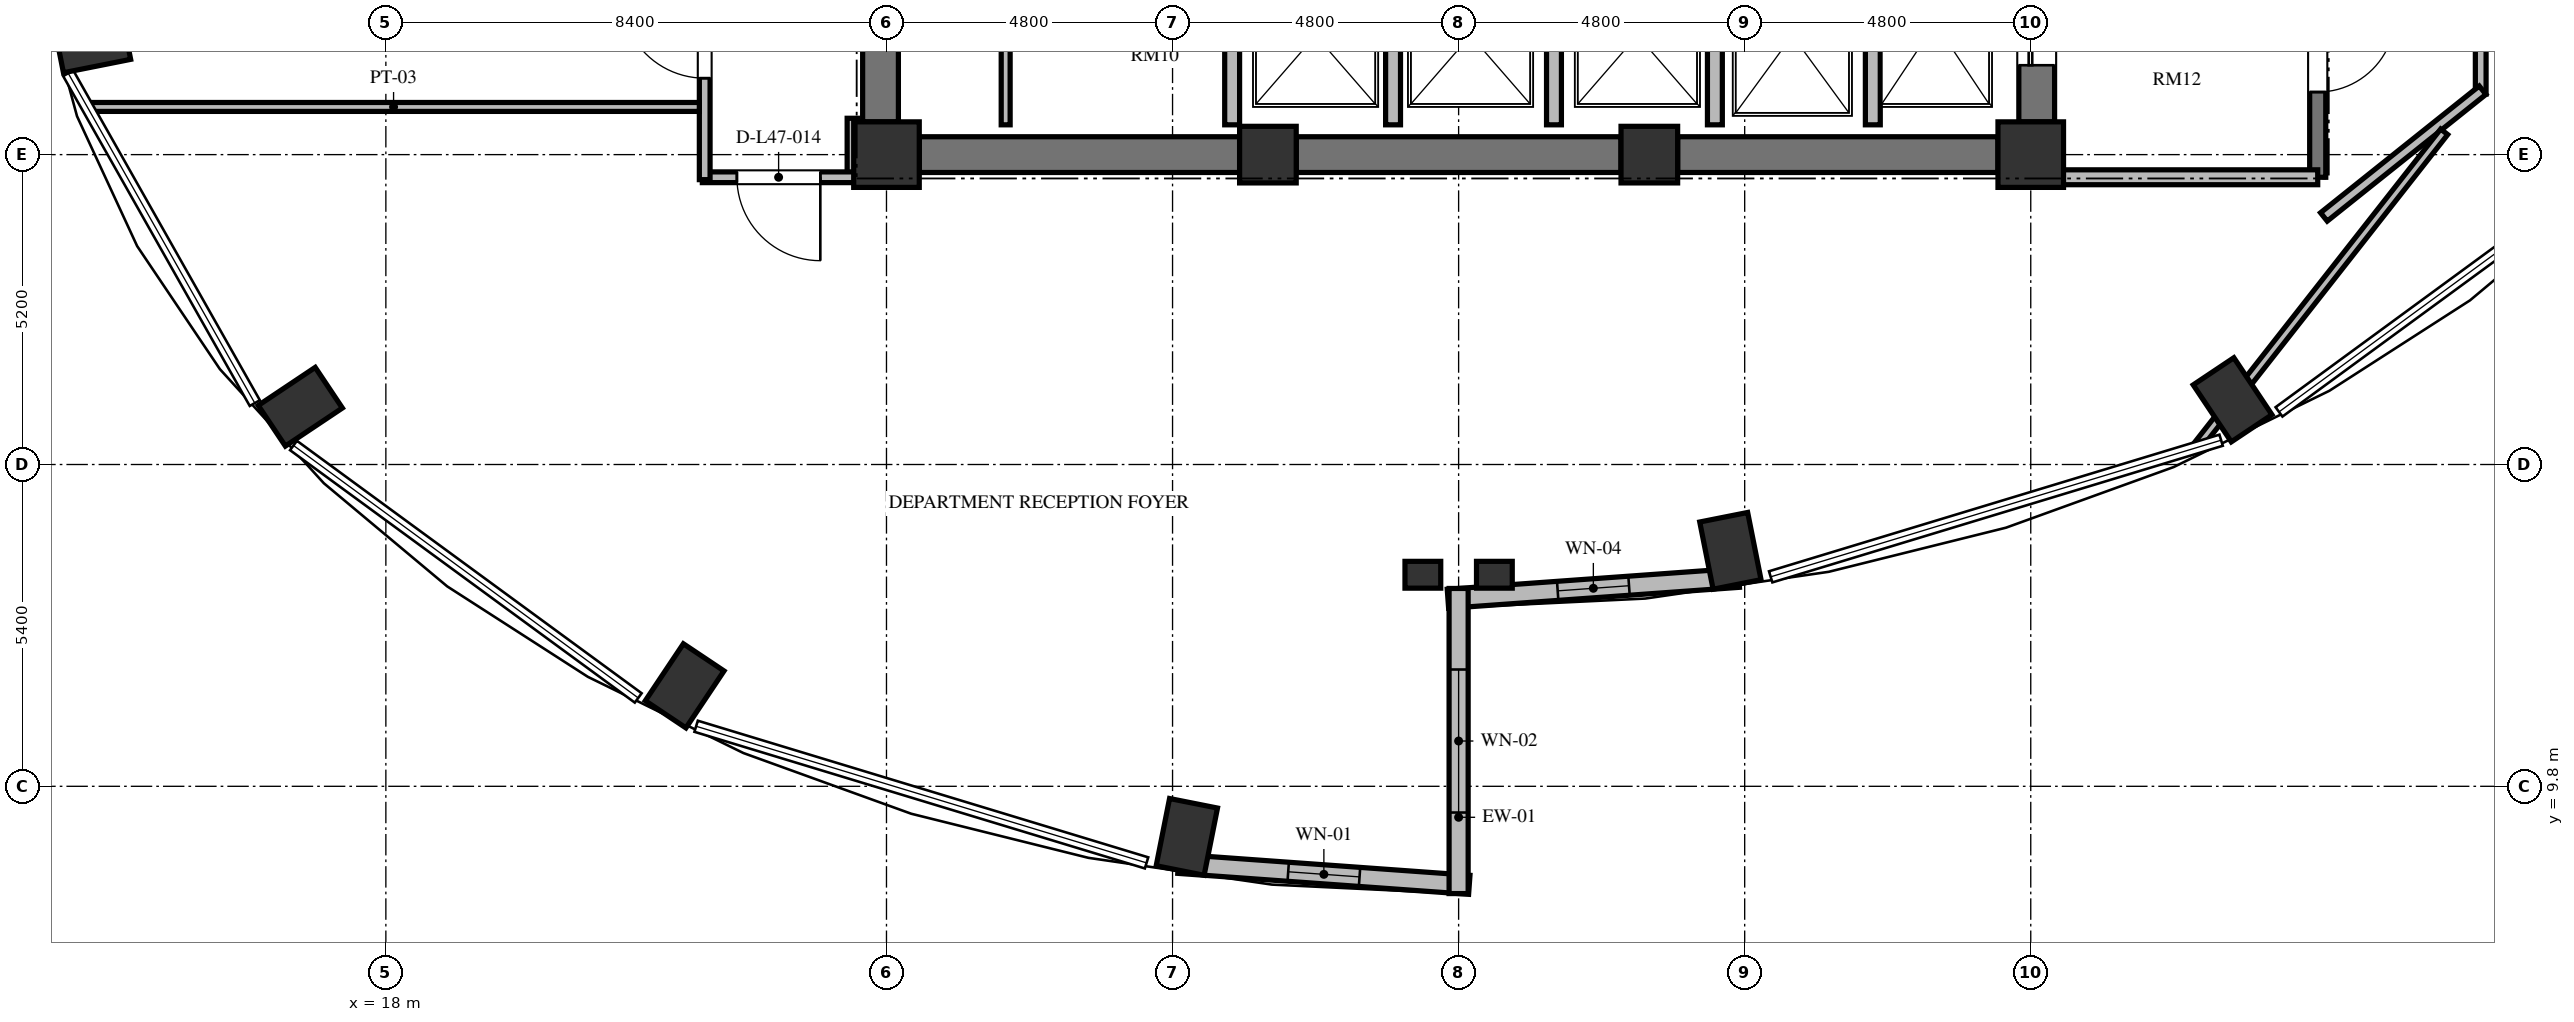
"""IFC4 building model, lengths in metres.
Left out: names, types, materials, properties, quantities, classifications, styles, units other than length and angle.
Written with IfcOpenShell. Run it as: python <this file> out.ifc"""

import sys

from ifc_helpers import new_model, si_unit, direction, frame, frame_2d, origin, origin_2d, place, context, subcontext, project, spatial, rectangle, extrude, element, fill, save


model = new_model("IFC4")
c1 = context("Model", 3, precision=1e-05, world=origin(), true_north=direction((0.0, 1.0)))
c2 = subcontext(c1, "Body", "Model", "MODEL_VIEW")
j1 = project(units=[si_unit("LENGTHUNIT", "METRE"), si_unit("PLANEANGLEUNIT", "RADIAN")], contexts=[c1])
p1 = place(None, origin())
s1 = spatial("IfcSite", under=j1, at=p1, CompositionType="ELEMENT")
p2 = place(p1, origin())
s2 = spatial("IfcBuilding", under=s1, at=p2, CompositionType="ELEMENT")
p3 = place(p2, frame((0.0, 0.0, 182.064)))
s3 = spatial("IfcBuildingStorey", under=s2, at=p3, CompositionType="ELEMENT", Elevation=182.064)
for number, where, z_axis, x_axis in (
    (1, (40.56, 13.751, 0.0), (0.0, 0.0, 1.0), (0.195, -0.981, 0.0)),
    (2, (48.987, 16.286, 0.0), (0.0, 0.0, 1.0), (0.556, -0.831, 0.0)),
    (3, (13.074, 22.288, 0.0), (0.0, 0.0, 1.0), (-0.981, -0.195, 0.0)),
    (4, (16.564, 16.169, 0.0), (0.0, 0.0, 1.0), (-0.831, -0.556, 0.0)),
    (5, (23.013, 11.486, 0.0), (0.0, 0.0, 1.0), (-0.556, -0.831, 0.0)),
    (6, (31.44, 8.951, 0.0), (0.0, 0.0, 1.0), (-0.195, -0.981, 0.0)),
):
    element("IfcColumn", number, at=place(p3, frame(where, z_axis=z_axis, x_axis=x_axis)), inside=s3, PredefinedType="COLUMN", context=c2, shape_type="SweptSolid", body=[
        extrude(rectangle(XDim=1.15, YDim=0.82, at=origin_2d()), origin(), (0.0, 0.0, 1.0), 3.648),
    ])
p4 = place(p3, frame((26.4, 20.4, 0.0), z_axis=(0.0, 0.0, 1.0), x_axis=(1.0, 0.0, 0.0)))
e7 = element("IfcColumn", 7, at=p4, inside=s3, PredefinedType="COLUMN", context=c2, shape_type="SweptSolid", body=[
    extrude(rectangle(XDim=1.1, YDim=1.1, at=origin_2d()), origin(), (0.0, 0.0, 1.0), 3.648),
])
for number, where, z_axis, x_axis in (
    (8, (32.8, 20.4, 0.0), (0.0, 0.0, 1.0), (1.0, 0.0, 0.0)),
    (9, (39.2, 20.4, 0.0), (0.0, 0.0, 1.0), (1.0, 0.0, 0.0)),
):
    element("IfcColumn", number, at=place(p3, frame(where, z_axis=z_axis, x_axis=x_axis)), inside=s3, PredefinedType="COLUMN", context=c2, shape_type="SweptSolid", body=[
        extrude(rectangle(XDim=0.95, YDim=0.95, at=origin_2d()), origin(), (0.0, 0.0, 1.0), 3.648),
    ])
p5 = place(p3, frame((45.6, 20.4, 0.0), z_axis=(0.0, 0.0, 1.0), x_axis=(1.0, 0.0, 0.0)))
e10 = element("IfcColumn", 10, at=p5, inside=s3, PredefinedType="COLUMN", context=c2, shape_type="SweptSolid", body=[
    extrude(rectangle(XDim=1.1, YDim=1.1, at=origin_2d()), origin(), (0.0, 0.0, 1.0), 3.648),
])
for number, where, z_axis, x_axis in (
    (11, (35.4, 13.35, 0.0), (0.0, 0.0, 1.0), (1.0, 0.0, 0.0)),
    (12, (36.6, 13.35, 0.0), (0.0, 0.0, 1.0), (1.0, 0.0, 0.0)),
):
    element("IfcColumn", number, at=place(p3, frame(where, z_axis=z_axis, x_axis=x_axis)), inside=s3, PredefinedType="PILASTER", context=c2, shape_type="SweptSolid", body=[
        extrude(rectangle(XDim=0.6, YDim=0.45, at=origin_2d()), origin(), (0.0, 0.0, 1.0), 3.648),
    ])
p6 = place(p3, frame((26.3, 20.95, 0.0), z_axis=(0.0, 0.0, 1.0), x_axis=(0.0, 1.0, 0.0)))
e13 = element("IfcWall", 13, at=p6, inside=s3, PredefinedType="SHEAR", context=c2, shape_type="SweptSolid", body=[
    extrude(rectangle(XDim=14.1, YDim=0.6, at=frame_2d((7.05, 0.0))), origin(), (0.0, 0.0, 1.0), 3.648),
])
p7 = place(p6, frame((6.5, 0.0, 0.0)))
e14 = element("IfcOpeningElement", 14, at=p7, cuts=e13, PredefinedType="OPENING", context=c2, shape_type="SweptSolid", body=[
    extrude(rectangle(XDim=1.2, YDim=2.15, at=frame_2d((0.6, 1.075))), frame((0.0, 0.31, 0.0), z_axis=(0.0, -1.0, 0.0), x_axis=(1.0, 0.0, 0.0)), (0.0, 0.0, 1.0), 0.62),
])
p8 = place(p6, frame((9.6, 0.0, 0.0)))
e15 = element("IfcOpeningElement", 15, at=p8, cuts=e13, PredefinedType="OPENING", context=c2, shape_type="SweptSolid", body=[
    extrude(rectangle(XDim=1.3, YDim=2.2, at=frame_2d((0.65, 1.1))), frame((0.0, 0.31, 0.0), z_axis=(0.0, -1.0, 0.0), x_axis=(1.0, 0.0, 0.0)), (0.0, 0.0, 1.0), 0.62),
])
p9 = place(p6, frame((3.26, 0.0, 0.0)))
e16 = element("IfcOpeningElement", 16, at=p9, cuts=e13, PredefinedType="OPENING", context=c2, shape_type="SweptSolid", body=[
    extrude(rectangle(XDim=1.3, YDim=2.2, at=frame_2d((0.65, 1.1))), frame((0.0, 0.31, 0.0), z_axis=(0.0, -1.0, 0.0), x_axis=(1.0, 0.0, 0.0)), (0.0, 0.0, 1.0), 0.62),
])
p10 = place(p3, frame((45.7, 20.95, 0.0), z_axis=(0.0, 0.0, 1.0), x_axis=(0.0, 1.0, 0.0)))
e17 = element("IfcWall", 17, at=p10, inside=s3, PredefinedType="SHEAR", context=c2, shape_type="SweptSolid", body=[
    extrude(rectangle(XDim=14.1, YDim=0.6, at=frame_2d((7.05, 0.0))), origin(), (0.0, 0.0, 1.0), 3.648),
])
p11 = place(p10, frame((11.75, 0.0, 0.0)))
e18 = element("IfcOpeningElement", 18, at=p11, cuts=e17, PredefinedType="OPENING", context=c2, shape_type="SweptSolid", body=[
    extrude(rectangle(XDim=1.4, YDim=2.3, at=frame_2d((0.7, 1.15))), frame((0.0, 0.31, 0.0), z_axis=(0.0, -1.0, 0.0), x_axis=(1.0, 0.0, 0.0)), (0.0, 0.0, 1.0), 0.62),
])
p12 = place(p10, frame((0.95, 0.0, 0.0)))
e19 = element("IfcOpeningElement", 19, at=p12, cuts=e17, PredefinedType="OPENING", context=c2, shape_type="SweptSolid", body=[
    extrude(rectangle(XDim=1.4, YDim=2.3, at=frame_2d((0.7, 1.15))), frame((0.0, 0.31, 0.0), z_axis=(0.0, -1.0, 0.0), x_axis=(1.0, 0.0, 0.0)), (0.0, 0.0, 1.0), 0.62),
])
p13 = place(p3, frame((26.95, 20.4, 0.0), z_axis=(0.0, 0.0, 1.0), x_axis=(1.0, 0.0, 0.0)))
e20 = element("IfcWall", 20, at=p13, inside=s3, PredefinedType="SHEAR", context=c2, shape_type="SweptSolid", body=[
    extrude(rectangle(XDim=5.375, YDim=0.6, at=frame_2d((2.688, 0.0))), origin(), (0.0, 0.0, 1.0), 3.648),
])
p14 = place(p3, frame((33.275, 20.4, 0.0), z_axis=(0.0, 0.0, 1.0), x_axis=(1.0, 0.0, 0.0)))
e21 = element("IfcWall", 21, at=p14, inside=s3, PredefinedType="SHEAR", context=c2, shape_type="SweptSolid", body=[
    extrude(rectangle(XDim=5.45, YDim=0.6, at=frame_2d((2.725, 0.0))), origin(), (0.0, 0.0, 1.0), 3.648),
])
p15 = place(p3, frame((39.675, 20.4, 0.0), z_axis=(0.0, 0.0, 1.0), x_axis=(1.0, 0.0, 0.0)))
e22 = element("IfcWall", 22, at=p15, inside=s3, PredefinedType="SHEAR", context=c2, shape_type="SweptSolid", body=[
    extrude(rectangle(XDim=5.375, YDim=0.6, at=frame_2d((2.688, 0.0))), origin(), (0.0, 0.0, 1.0), 3.648),
])
p16 = place(p3, frame((35.821, 12.947, 0.0), z_axis=(0.0, 0.0, 1.0), x_axis=(0.997415460462, 0.071849838072, 0.0)))
e23 = element("IfcWall", 23, at=p16, inside=s3, PredefinedType="SOLIDWALL", context=c2, shape_type="SweptSolid", body=[
    extrude(rectangle(XDim=4.893, YDim=0.32, at=frame_2d((2.447, 0.0))), origin(), (0.0, 0.0, 1.0), 3.428),
])
p17 = place(p16, frame((1.846, 0.0, 0.85)))
e24 = element("IfcOpeningElement", 24, at=p17, cuts=e23, PredefinedType="OPENING", context=c2, shape_type="SweptSolid", body=[
    extrude(rectangle(XDim=1.2, YDim=1.8, at=frame_2d((0.6, 0.9))), frame((0.0, 0.17, 0.0), z_axis=(0.0, -1.0, 0.0), x_axis=(1.0, 0.0, 0.0)), (0.0, 0.0, 1.0), 0.34),
])
p18 = place(p3, frame((31.299, 8.499, 0.0), z_axis=(0.0, 0.0, 1.0), x_axis=(0.997415202861, -0.071853413984, 0.0)))
e25 = element("IfcWall", 25, at=p18, inside=s3, PredefinedType="SOLIDWALL", context=c2, shape_type="SweptSolid", body=[
    extrude(rectangle(XDim=4.893, YDim=0.32, at=frame_2d((2.446, 0.0))), origin(), (0.0, 0.0, 1.0), 3.428),
])
p19 = place(p18, frame((1.846, 0.0, 0.85)))
e26 = element("IfcOpeningElement", 26, at=p19, cuts=e25, PredefinedType="OPENING", context=c2, shape_type="SweptSolid", body=[
    extrude(rectangle(XDim=1.2, YDim=2.2, at=frame_2d((0.6, 1.1))), frame((0.0, 0.17, 0.0), z_axis=(0.0, -1.0, 0.0), x_axis=(1.0, 0.0, 0.0)), (0.0, 0.0, 1.0), 0.34),
])
p20 = place(p3, frame((36.0, 8.0, 0.0), z_axis=(0.0, 0.0, 1.0), x_axis=(0.0, 1.0, 0.0)))
e27 = element("IfcWall", 27, at=p20, inside=s3, PredefinedType="SOLIDWALL", context=c2, shape_type="SweptSolid", body=[
    extrude(rectangle(XDim=5.12, YDim=0.32, at=frame_2d((2.56, 0.0))), origin(), (0.0, 0.0, 1.0), 3.428),
])
p21 = place(p20, frame((1.36, 0.0, 0.84)))
e28 = element("IfcOpeningElement", 28, at=p21, cuts=e27, PredefinedType="OPENING", context=c2, shape_type="SweptSolid", body=[
    extrude(rectangle(XDim=2.4, YDim=2.04, at=frame_2d((1.2, 1.02))), frame((0.0, 0.17, 0.0), z_axis=(0.0, -1.0, 0.0), x_axis=(1.0, 0.0, 0.0)), (0.0, 0.0, 1.0), 0.34),
])
p22 = place(p3, frame((42.95, 20.9, 0.0), z_axis=(0.0, 0.0, 1.0), x_axis=(0.0, 1.0, 0.0)))
e29 = element("IfcWall", 29, at=p22, inside=s3, PredefinedType="SOLIDWALL", context=c2, shape_type="SweptSolid", body=[
    extrude(rectangle(XDim=3.2, YDim=0.25, at=frame_2d((1.6, 0.0))), origin(), (0.0, 0.0, 1.0), 3.428),
])
for number, where, z_axis, x_axis in (
    (30, (32.2, 20.9, 0.0), (0.0, 0.0, 1.0), (0.0, 1.0, 0.0)),
    (31, (34.9, 20.9, 0.0), (0.0, 0.0, 1.0), (0.0, 1.0, 0.0)),
    (32, (37.6, 20.9, 0.0), (0.0, 0.0, 1.0), (0.0, 1.0, 0.0)),
    (33, (40.3, 20.9, 0.0), (0.0, 0.0, 1.0), (0.0, 1.0, 0.0)),
):
    element("IfcWall", number, at=place(p3, frame(where, z_axis=z_axis, x_axis=x_axis)), inside=s3, PredefinedType="SOLIDWALL", context=c2, shape_type="SweptSolid", body=[
        extrude(rectangle(XDim=2.8, YDim=0.25, at=frame_2d((1.4, 0.0))), origin(), (0.0, 0.0, 1.0), 3.428),
    ])
p23 = place(p3, frame((28.4, 20.9, 0.0), z_axis=(0.0, 0.0, 1.0), x_axis=(0.0, 1.0, 0.0)))
e34 = element("IfcWall", 34, at=p23, inside=s3, PredefinedType="PARTITIONING", context=c2, shape_type="SweptSolid", body=[
    extrude(rectangle(XDim=2.8, YDim=0.15, at=frame_2d((1.4, 0.0))), origin(), (0.0, 0.0, 1.0), 3.428),
])
p24 = place(p3, frame((50.415, 35.845, 0.0), z_axis=(0.0, 0.0, 1.0), x_axis=(0.0, -1.0, 0.0)))
e35 = element("IfcWall", 35, at=p24, inside=s3, PredefinedType="SHEAR", context=c2, shape_type="SweptSolid", body=[
    extrude(rectangle(XDim=15.825, YDim=0.27, at=frame_2d((7.913, 0.0))), origin(), (0.0, 0.0, 1.0), 3.648),
])
p25 = place(p24, frame((4.445, 0.0, 0.0)))
e36 = element("IfcOpeningElement", 36, at=p25, cuts=e35, PredefinedType="OPENING", context=c2, shape_type="SweptSolid", body=[
    extrude(rectangle(XDim=1.2, YDim=2.15, at=frame_2d((0.6, 1.075))), frame((0.0, 0.145, 0.0), z_axis=(0.0, -1.0, 0.0), x_axis=(1.0, 0.0, 0.0)), (0.0, 0.0, 1.0), 0.29),
])
p26 = place(p24, frame((1.295, 0.0, 0.0)))
e37 = element("IfcOpeningElement", 37, at=p26, cuts=e35, PredefinedType="OPENING", context=c2, shape_type="SweptSolid", body=[
    extrude(rectangle(XDim=1.3, YDim=2.2, at=frame_2d((0.65, 1.1))), frame((0.0, 0.145, 0.0), z_axis=(0.0, -1.0, 0.0), x_axis=(1.0, 0.0, 0.0)), (0.0, 0.0, 1.0), 0.29),
])
p27 = place(p24, frame((13.095, 0.0, 0.0)))
e38 = element("IfcOpeningElement", 38, at=p27, cuts=e35, PredefinedType="OPENING", context=c2, shape_type="SweptSolid", body=[
    extrude(rectangle(XDim=1.3, YDim=2.2, at=frame_2d((0.65, 1.1))), frame((0.0, 0.145, 0.0), z_axis=(0.0, -1.0, 0.0), x_axis=(1.0, 0.0, 0.0)), (0.0, 0.0, 1.0), 0.29),
])
p28 = place(p3, frame((45.7, 20.02, 0.0), z_axis=(0.0, 0.0, 1.0), x_axis=(1.0, 0.0, 0.0)))
e39 = element("IfcWall", 39, at=p28, inside=s3, PredefinedType="SOLIDWALL", context=c2, shape_type="SweptSolid", body=[
    extrude(rectangle(XDim=4.715, YDim=0.25, at=frame_2d((2.357, 0.0))), origin(), (0.0, 0.0, 1.0), 3.428),
])
p29 = place(p3, frame((53.15, 38.79, 0.0), z_axis=(0.0, 0.0, 1.0), x_axis=(0.0, -1.0, 0.0)))
e40 = element("IfcWall", 40, at=p29, inside=s3, PredefinedType="PARTITIONING", context=c2, shape_type="SweptSolid", body=[
    extrude(rectangle(XDim=17.374, YDim=0.18, at=frame_2d((8.687, 0.0))), origin(), (0.0, 0.0, 1.0), 3.428),
])
p30 = place(p29, frame((8.162, 0.0, 0.0)))
e41 = element("IfcOpeningElement", 41, at=p30, cuts=e40, PredefinedType="OPENING", context=c2, shape_type="SweptSolid", body=[
    extrude(rectangle(XDim=1.05, YDim=2.15, at=frame_2d((0.525, 1.075))), frame((0.0, 0.1, 0.0), z_axis=(0.0, -1.0, 0.0), x_axis=(1.0, 0.0, 0.0)), (0.0, 0.0, 1.0), 0.2),
])
p31 = place(p3, frame((53.181, 21.481, 0.0), z_axis=(0.0, 0.0, 1.0), x_axis=(-0.781420737726, -0.624004511724, 0.0)))
e42 = element("IfcWall", 42, at=p31, inside=s3, PredefinedType="PARTITIONING", context=c2, shape_type="SweptSolid", body=[
    extrude(rectangle(XDim=3.407, YDim=0.18, at=frame_2d((1.704, 0.0))), origin(), (0.0, 0.0, 1.0), 3.428),
])
p32 = place(p3, frame((25.83, 21.01, 0.0), z_axis=(0.0, 0.0, 1.0), x_axis=(0.0, -1.0, 0.0)))
e43 = element("IfcWall", 43, at=p32, inside=s3, PredefinedType="PARTITIONING", context=c2, shape_type="SweptSolid", body=[
    extrude(rectangle(XDim=1.03, YDim=0.18, at=frame_2d((0.515, 0.0))), origin(), (0.0, 0.0, 1.0), 3.428),
])
p33 = place(p3, frame((25.87, 20.02, 0.0), z_axis=(0.0, 0.0, 1.0), x_axis=(-1.0, 0.0, 0.0)))
e44 = element("IfcWall", 44, at=p33, inside=s3, PredefinedType="PARTITIONING", context=c2, shape_type="SweptSolid", body=[
    extrude(rectangle(XDim=2.56, YDim=0.18, at=frame_2d((1.28, 0.0))), origin(), (0.0, 0.0, 1.0), 3.428),
])
p34 = place(p33, frame((0.58, 0.0, 0.0)))
e45 = element("IfcOpeningElement", 45, at=p34, cuts=e44, PredefinedType="OPENING", context=c2, shape_type="SweptSolid", body=[
    extrude(rectangle(XDim=1.4, YDim=2.2, at=frame_2d((0.7, 1.1))), frame((0.0, 0.1, 0.0), z_axis=(0.0, -1.0, 0.0), x_axis=(1.0, 0.0, 0.0)), (0.0, 0.0, 1.0), 0.2),
])
p35 = place(p3, frame((23.35, 19.98, 0.0), z_axis=(0.0, 0.0, 1.0), x_axis=(0.0, 1.0, 0.0)))
e46 = element("IfcWall", 46, at=p35, inside=s3, PredefinedType="PARTITIONING", context=c2, shape_type="SweptSolid", body=[
    extrude(rectangle(XDim=5.06, YDim=0.18, at=frame_2d((2.53, 0.0))), origin(), (0.0, 0.0, 1.0), 3.428),
])
p36 = place(p35, frame((1.702, 0.0, 0.0)))
e47 = element("IfcOpeningElement", 47, at=p36, cuts=e46, PredefinedType="OPENING", context=c2, shape_type="SweptSolid", body=[
    extrude(rectangle(XDim=1.4, YDim=2.2, at=frame_2d((0.7, 1.1))), frame((0.0, 0.1, 0.0), z_axis=(0.0, -1.0, 0.0), x_axis=(1.0, 0.0, 0.0)), (0.0, 0.0, 1.0), 0.2),
])
p37 = place(p3, frame((12.999, 21.2, 0.0), z_axis=(0.0, 0.0, 1.0), x_axis=(1.0, 0.0, 0.0)))
e48 = element("IfcWall", 48, at=p37, inside=s3, PredefinedType="PARTITIONING", context=c2, shape_type="SweptSolid", body=[
    extrude(rectangle(XDim=10.261, YDim=0.15, at=frame_2d((5.131, 0.0))), origin(), (0.0, 0.0, 1.0), 2.863),
])
p38 = place(p3, frame((52.537, 20.783, 0.0), z_axis=(0.0, 0.0, 1.0), x_axis=(-0.617570357244, -0.786515641201, 0.0)))
e49 = element("IfcWall", 49, at=p38, inside=s3, PredefinedType="PARTITIONING", context=c2, shape_type="SweptSolid", body=[
    extrude(rectangle(XDim=6.74, YDim=0.15, at=frame_2d((3.37, 0.0))), origin(), (0.0, 0.0, 1.0), 2.863),
])
p39 = place(p17, origin())
e50 = element("IfcWindow", 50, at=p39, inside=s3, PartitioningType="SINGLE_PANEL", PredefinedType="WINDOW", context=c2, shape_type="SweptSolid", body=[
    extrude(rectangle(XDim=1.2, YDim=1.8, at=frame_2d((0.6, 0.9))), frame((0.0, 0.03, 0.0), z_axis=(0.0, -1.0, 0.0), x_axis=(1.0, 0.0, 0.0)), (0.0, 0.0, 1.0), 0.06),
])
fill(e24, e50)
p40 = place(p19, origin())
e51 = element("IfcWindow", 51, at=p40, inside=s3, PartitioningType="SINGLE_PANEL", PredefinedType="WINDOW", context=c2, shape_type="SweptSolid", body=[
    extrude(rectangle(XDim=1.2, YDim=2.2, at=frame_2d((0.6, 1.1))), frame((0.0, 0.03, 0.0), z_axis=(0.0, -1.0, 0.0), x_axis=(1.0, 0.0, 0.0)), (0.0, 0.0, 1.0), 0.06),
])
fill(e26, e51)
p41 = place(p21, origin())
e52 = element("IfcWindow", 52, at=p41, inside=s3, PartitioningType="SINGLE_PANEL", PredefinedType="WINDOW", context=c2, shape_type="SweptSolid", body=[
    extrude(rectangle(XDim=2.4, YDim=2.04, at=frame_2d((1.2, 1.02))), frame((0.0, 0.03, 0.0), z_axis=(0.0, -1.0, 0.0), x_axis=(1.0, 0.0, 0.0)), (0.0, 0.0, 1.0), 0.06),
])
fill(e28, e52)
p42 = place(p12, origin())
e53 = element("IfcDoor", 53, at=p42, inside=s3, OperationType="SLIDING_TO_LEFT", PredefinedType="DOOR", context=c2, shape_type="SweptSolid", body=[
    extrude(rectangle(XDim=1.4, YDim=2.3, at=frame_2d((0.7, 1.15))), frame((0.0, 0.025, 0.0), z_axis=(0.0, -1.0, 0.0), x_axis=(1.0, 0.0, 0.0)), (0.0, 0.0, 1.0), 0.05),
])
fill(e19, e53)
p43 = place(p27, origin())
e54 = element("IfcDoor", 54, at=p43, inside=s3, OperationType="SINGLE_SWING_LEFT", PredefinedType="DOOR", context=c2, shape_type="SweptSolid", body=[
    extrude(rectangle(XDim=1.3, YDim=2.2, at=frame_2d((0.65, 1.1))), frame((0.0, 0.025, 0.0), z_axis=(0.0, -1.0, 0.0), x_axis=(1.0, 0.0, 0.0)), (0.0, 0.0, 1.0), 0.05),
])
fill(e38, e54)
p44 = place(p36, origin())
e55 = element("IfcDoor", 55, at=p44, inside=s3, OperationType="SINGLE_SWING_RIGHT", PredefinedType="DOOR", context=c2, shape_type="SweptSolid", body=[
    extrude(rectangle(XDim=1.4, YDim=2.2, at=frame_2d((0.7, 1.1))), frame((0.0, 0.025, 0.0), z_axis=(0.0, -1.0, 0.0), x_axis=(1.0, 0.0, 0.0)), (0.0, 0.0, 1.0), 0.05),
])
fill(e47, e55)
p45 = place(p34, origin())
e56 = element("IfcDoor", 56, at=p45, inside=s3, OperationType="SINGLE_SWING_LEFT", PredefinedType="DOOR", context=c2, shape_type="SweptSolid", body=[
    extrude(rectangle(XDim=1.4, YDim=2.2, at=frame_2d((0.7, 1.1))), frame((0.0, 0.025, 0.0), z_axis=(0.0, -1.0, 0.0), x_axis=(1.0, 0.0, 0.0)), (0.0, 0.0, 1.0), 0.05),
])
fill(e45, e56)
save(model, sys.argv[1])
